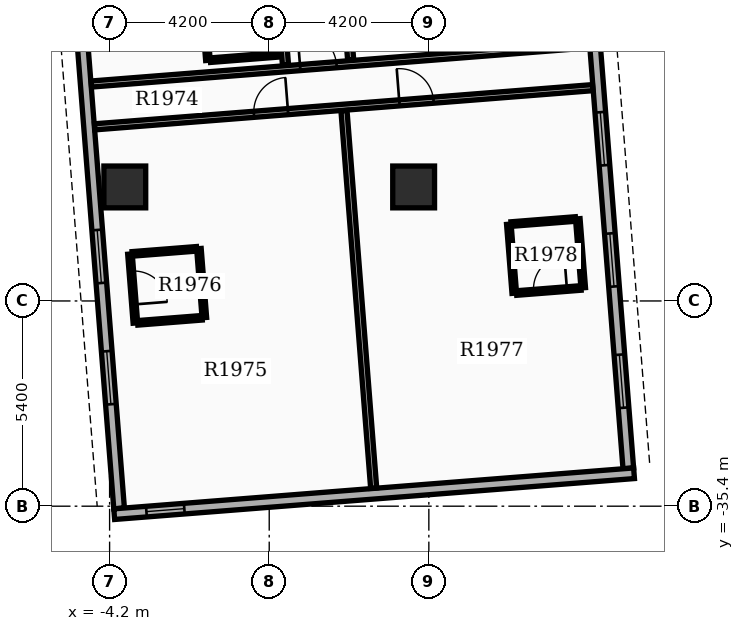
"""IFC4 building model, lengths in metres.
Left out: names, types, materials, properties, quantities, classifications, styles, units other than length and angle.
Written with IfcOpenShell. Run it as: python <this file> out.ifc"""

import sys

from ifc_helpers import new_model, si_unit, direction, frame, frame_2d, origin, origin_2d, place, context, subcontext, project, spatial, rectangle, extrude, element, fill, save


model = new_model("IFC4")
c1 = context("Model", 3, precision=1e-05, world=origin(), true_north=direction((0.0, 1.0)))
c2 = subcontext(c1, "Body", "Model", "MODEL_VIEW")
j1 = project(units=[si_unit("LENGTHUNIT", "METRE"), si_unit("PLANEANGLEUNIT", "RADIAN")], contexts=[c1])
p1 = place(None, origin())
s1 = spatial("IfcSite", under=j1, at=p1, CompositionType="ELEMENT")
p2 = place(p1, origin())
s2 = spatial("IfcBuilding", under=s1, at=p2, CompositionType="ELEMENT")
p3 = place(p2, frame((0.0, 0.0, 124.2)))
s3 = spatial("IfcBuildingStorey", under=s2, at=p3, CompositionType="ELEMENT", Elevation=124.2)
for number, where, z_axis, x_axis in (
    (1, (-3.8, -27.0, 0.0), (0.0, 0.0, 1.0), (1.0, 0.0, 0.0)),
    (2, (3.8, -27.0, 0.0), (0.0, 0.0, 1.0), (1.0, 0.0, 0.0)),
):
    element("IfcColumn", number, at=place(p3, frame(where, z_axis=z_axis, x_axis=x_axis)), inside=s3, PredefinedType="COLUMN", context=c2, shape_type="SweptSolid", body=[
        extrude(rectangle(XDim=1.1, YDim=1.1, at=origin_2d()), origin(), (0.0, 0.0, 1.0), 3.9),
    ])
p4 = place(p3, frame((-5.527, -15.421, 0.0), z_axis=(0.0, 0.0, 1.0), x_axis=(0.078452802979, -0.996917828963, 0.0)))
e3 = element("IfcWall", 3, at=p4, inside=s3, PredefinedType="STANDARD", context=c2, shape_type="SweptSolid", body=[
    extrude(rectangle(XDim=20.1, YDim=0.28, at=frame_2d((10.05, 0.0))), origin(), (0.0, 0.0, 1.0), 2.97),
])
p5 = place(p4, frame((1.6, 0.0, 0.8)))
e4 = element("IfcOpeningElement", 4, at=p5, cuts=e3, PredefinedType="OPENING", context=c2, shape_type="SweptSolid", body=[
    extrude(rectangle(XDim=1.4, YDim=1.6, at=frame_2d((0.7, 0.8))), frame((0.0, 0.15, 0.0), z_axis=(0.0, -1.0, 0.0), x_axis=(1.0, 0.0, 0.0)), (0.0, 0.0, 1.0), 0.3),
])
p6 = place(p4, frame((4.8, 0.0, 0.8)))
e5 = element("IfcOpeningElement", 5, at=p6, cuts=e3, PredefinedType="OPENING", context=c2, shape_type="SweptSolid", body=[
    extrude(rectangle(XDim=1.4, YDim=1.6, at=frame_2d((0.7, 0.8))), frame((0.0, 0.15, 0.0), z_axis=(0.0, -1.0, 0.0), x_axis=(1.0, 0.0, 0.0)), (0.0, 0.0, 1.0), 0.3),
])
p7 = place(p4, frame((12.75, 0.0, 0.8)))
e6 = element("IfcOpeningElement", 6, at=p7, cuts=e3, PredefinedType="OPENING", context=c2, shape_type="SweptSolid", body=[
    extrude(rectangle(XDim=1.4, YDim=1.6, at=frame_2d((0.7, 0.8))), frame((0.0, 0.15, 0.0), z_axis=(0.0, -1.0, 0.0), x_axis=(1.0, 0.0, 0.0)), (0.0, 0.0, 1.0), 0.3),
])
p8 = place(p4, frame((15.95, 0.0, 0.8)))
e7 = element("IfcOpeningElement", 7, at=p8, cuts=e3, PredefinedType="OPENING", context=c2, shape_type="SweptSolid", body=[
    extrude(rectangle(XDim=1.4, YDim=1.6, at=frame_2d((0.7, 0.8))), frame((0.0, 0.15, 0.0), z_axis=(0.0, -1.0, 0.0), x_axis=(1.0, 0.0, 0.0)), (0.0, 0.0, 1.0), 0.3),
])
p9 = place(p3, frame((9.448, -34.405, 0.0), z_axis=(0.0, 0.0, 1.0), x_axis=(-0.078452802979, 0.996917828963, 0.0)))
e8 = element("IfcWall", 8, at=p9, inside=s3, PredefinedType="STANDARD", context=c2, shape_type="SweptSolid", body=[
    extrude(rectangle(XDim=20.1, YDim=0.28, at=frame_2d((10.05, 0.0))), origin(), (0.0, 0.0, 1.0), 2.97),
])
p10 = place(p9, frame((1.6, 0.0, 0.8)))
e9 = element("IfcOpeningElement", 9, at=p10, cuts=e8, PredefinedType="OPENING", context=c2, shape_type="SweptSolid", body=[
    extrude(rectangle(XDim=1.4, YDim=1.6, at=frame_2d((0.7, 0.8))), frame((0.0, 0.15, 0.0), z_axis=(0.0, -1.0, 0.0), x_axis=(1.0, 0.0, 0.0)), (0.0, 0.0, 1.0), 0.3),
])
p11 = place(p9, frame((4.8, 0.0, 0.8)))
e10 = element("IfcOpeningElement", 10, at=p11, cuts=e8, PredefinedType="OPENING", context=c2, shape_type="SweptSolid", body=[
    extrude(rectangle(XDim=1.4, YDim=1.6, at=frame_2d((0.7, 0.8))), frame((0.0, 0.15, 0.0), z_axis=(0.0, -1.0, 0.0), x_axis=(1.0, 0.0, 0.0)), (0.0, 0.0, 1.0), 0.3),
])
p12 = place(p9, frame((8.0, 0.0, 0.8)))
e11 = element("IfcOpeningElement", 11, at=p12, cuts=e8, PredefinedType="OPENING", context=c2, shape_type="SweptSolid", body=[
    extrude(rectangle(XDim=1.4, YDim=1.6, at=frame_2d((0.7, 0.8))), frame((0.0, 0.15, 0.0), z_axis=(0.0, -1.0, 0.0), x_axis=(1.0, 0.0, 0.0)), (0.0, 0.0, 1.0), 0.3),
])
p13 = place(p9, frame((11.7, 0.0, 0.8)))
e12 = element("IfcOpeningElement", 12, at=p13, cuts=e8, PredefinedType="OPENING", context=c2, shape_type="SweptSolid", body=[
    extrude(rectangle(XDim=1.4, YDim=1.6, at=frame_2d((0.7, 0.8))), frame((0.0, 0.15, 0.0), z_axis=(0.0, -1.0, 0.0), x_axis=(1.0, 0.0, 0.0)), (0.0, 0.0, 1.0), 0.3),
])
p14 = place(p3, frame((-4.079, -35.61, 0.0), z_axis=(0.0, 0.0, 1.0), x_axis=(0.996916198482, 0.078473519122, 0.0)))
e13 = element("IfcWall", 13, at=p14, inside=s3, PredefinedType="STANDARD", context=c2, shape_type="SweptSolid", body=[
    extrude(rectangle(XDim=13.72, YDim=0.28, at=frame_2d((6.86, 0.0))), origin(), (0.0, 0.0, 1.0), 2.97),
])
p15 = place(p14, frame((0.85, 0.0, 0.85)))
e14 = element("IfcOpeningElement", 14, at=p15, cuts=e13, PredefinedType="OPENING", context=c2, shape_type="SweptSolid", body=[
    extrude(rectangle(XDim=1.0, YDim=1.5, at=frame_2d((0.5, 0.75))), frame((0.0, 0.15, 0.0), z_axis=(0.0, -1.0, 0.0), x_axis=(1.0, 0.0, 0.0)), (0.0, 0.0, 1.0), 0.3),
])
p16 = place(p3, frame((1.444, -14.782, 0.0), z_axis=(0.0, 0.0, 1.0), x_axis=(0.078454258523, -0.996917714418, 0.0)))
e15 = element("IfcWall", 15, at=p16, inside=s3, PredefinedType="PARTITIONING", context=c2, shape_type="SweptSolid", body=[
    extrude(rectangle(XDim=8.9, YDim=0.16, at=frame_2d((4.45, 0.0))), origin(), (0.0, 0.0, 1.0), 2.96),
])
p17 = place(p16, frame((7.5, 0.0, 0.0)))
e16 = element("IfcOpeningElement", 16, at=p17, cuts=e15, PredefinedType="OPENING", context=c2, shape_type="SweptSolid", body=[
    extrude(rectangle(XDim=0.96, YDim=2.15, at=frame_2d((0.48, 1.075))), frame((0.0, 0.09, 0.0), z_axis=(0.0, -1.0, 0.0), x_axis=(1.0, 0.0, 0.0)), (0.0, 0.0, 1.0), 0.18),
])
p18 = place(p3, frame((-0.271, -14.917, 0.0), z_axis=(0.0, 0.0, 1.0), x_axis=(0.078454258523, -0.996917714418, 0.0)))
e17 = element("IfcWall", 17, at=p18, inside=s3, PredefinedType="PARTITIONING", context=c2, shape_type="SweptSolid", body=[
    extrude(rectangle(XDim=8.9, YDim=0.16, at=frame_2d((4.45, 0.0))), origin(), (0.0, 0.0, 1.0), 2.96),
])
p19 = place(p18, frame((0.953, 0.0, 0.0)))
e18 = element("IfcOpeningElement", 18, at=p19, cuts=e17, PredefinedType="OPENING", context=c2, shape_type="SweptSolid", body=[
    extrude(rectangle(XDim=0.96, YDim=2.15, at=frame_2d((0.48, 1.075))), frame((0.0, 0.09, 0.0), z_axis=(0.0, -1.0, 0.0), x_axis=(1.0, 0.0, 0.0)), (0.0, 0.0, 1.0), 0.18),
])
p20 = place(p3, frame((-1.548, -23.664, 0.0), z_axis=(0.0, 0.0, 1.0), x_axis=(0.996916400774, 0.0784709492, 0.0)))
e19 = element("IfcWall", 19, at=p20, inside=s3, PredefinedType="PARTITIONING", context=c2, shape_type="SweptSolid", body=[
    extrude(rectangle(XDim=1.82, YDim=0.12, at=frame_2d((0.91, 0.0))), origin(), (0.0, 0.0, 1.0), 2.96),
])
p21 = place(p3, frame((-1.76, -21.795, 0.0), z_axis=(0.0, 0.0, 1.0), x_axis=(0.078573415792, -0.996908329954, 0.0)))
e20 = element("IfcWall", 20, at=p21, inside=s3, PredefinedType="PARTITIONING", context=c2, shape_type="SweptSolid", body=[
    extrude(rectangle(XDim=1.88, YDim=0.12, at=frame_2d((0.94, 0.0))), origin(), (0.0, 0.0, 1.0), 2.96),
])
p22 = place(p3, frame((-4.68, -24.292, 0.0), z_axis=(0.0, 0.0, 1.0), x_axis=(0.996917447065, 0.078457655694, 0.0)))
e21 = element("IfcWall", 21, at=p22, inside=s3, PredefinedType="PARTITIONING", context=c2, shape_type="SweptSolid", body=[
    extrude(rectangle(XDim=13.144, YDim=0.16, at=frame_2d((6.572, 0.0))), origin(), (0.0, 0.0, 1.0), 2.96),
])
p23 = place(p22, frame((5.512, 0.0, 0.0)))
e22 = element("IfcOpeningElement", 22, at=p23, cuts=e21, PredefinedType="OPENING", context=c2, shape_type="SweptSolid", body=[
    extrude(rectangle(XDim=0.96, YDim=2.15, at=frame_2d((0.48, 1.075))), frame((0.0, 0.09, 0.0), z_axis=(0.0, -1.0, 0.0), x_axis=(1.0, 0.0, 0.0)), (0.0, 0.0, 1.0), 0.18),
])
p24 = place(p3, frame((-4.592, -25.419, 0.0), z_axis=(0.0, 0.0, 1.0), x_axis=(0.996915994096, 0.078476115573, 0.0)))
e23 = element("IfcWall", 23, at=p24, inside=s3, PredefinedType="PARTITIONING", context=c2, shape_type="SweptSolid", body=[
    extrude(rectangle(XDim=13.144, YDim=0.16, at=frame_2d((6.572, 0.0))), origin(), (0.0, 0.0, 1.0), 2.96),
])
p25 = place(p24, frame((4.202, 0.0, 0.0)))
e24 = element("IfcOpeningElement", 24, at=p25, cuts=e23, PredefinedType="OPENING", context=c2, shape_type="SweptSolid", body=[
    extrude(rectangle(XDim=0.9, YDim=2.15, at=frame_2d((0.45, 1.075))), frame((0.0, 0.09, 0.0), z_axis=(0.0, -1.0, 0.0), x_axis=(1.0, 0.0, 0.0)), (0.0, 0.0, 1.0), 0.18),
])
p26 = place(p24, frame((8.042, 0.0, 0.0)))
e25 = element("IfcOpeningElement", 25, at=p26, cuts=e23, PredefinedType="OPENING", context=c2, shape_type="SweptSolid", body=[
    extrude(rectangle(XDim=0.9, YDim=2.15, at=frame_2d((0.45, 1.075))), frame((0.0, 0.09, 0.0), z_axis=(0.0, -1.0, 0.0), x_axis=(1.0, 0.0, 0.0)), (0.0, 0.0, 1.0), 0.18),
])
p27 = place(p3, frame((1.967, -24.993, 0.0), z_axis=(0.0, 0.0, 1.0), x_axis=(0.078446753713, -0.996918304994, 0.0)))
e26 = element("IfcWall", 26, at=p27, inside=s3, PredefinedType="PARTITIONING", context=c2, shape_type="SweptSolid", body=[
    extrude(rectangle(XDim=9.962, YDim=0.16, at=frame_2d((4.981, 0.0))), origin(), (0.0, 0.0, 1.0), 2.96),
])
p28 = place(p3, frame((-3.664, -28.766, 0.0), z_axis=(0.0, 0.0, 1.0), x_axis=(0.0784709492, -0.996916400774, 0.0)))
e27 = element("IfcWall", 27, at=p28, inside=s3, PredefinedType="PARTITIONING", context=c2, shape_type="SweptSolid", body=[
    extrude(rectangle(XDim=1.82, YDim=0.12, at=frame_2d((0.91, 0.0))), origin(), (0.0, 0.0, 1.0), 2.96),
])
p29 = place(p28, frame((0.45, 0.0, 0.0)))
e28 = element("IfcOpeningElement", 28, at=p29, cuts=e27, PredefinedType="OPENING", context=c2, shape_type="SweptSolid", body=[
    extrude(rectangle(XDim=0.88, YDim=2.1, at=frame_2d((0.44, 1.05))), frame((0.0, 0.07, 0.0), z_axis=(0.0, -1.0, 0.0), x_axis=(1.0, 0.0, 0.0)), (0.0, 0.0, 1.0), 0.14),
])
p30 = place(p3, frame((-1.85, -28.623, 0.0), z_axis=(0.0, 0.0, 1.0), x_axis=(0.0784709492, -0.996916400774, 0.0)))
e29 = element("IfcWall", 29, at=p30, inside=s3, PredefinedType="PARTITIONING", context=c2, shape_type="SweptSolid", body=[
    extrude(rectangle(XDim=1.82, YDim=0.12, at=frame_2d((0.91, 0.0))), origin(), (0.0, 0.0, 1.0), 2.96),
])
p31 = place(p3, frame((-3.604, -28.761, 0.0), z_axis=(0.0, 0.0, 1.0), x_axis=(0.996920349899, 0.078420762289, 0.0)))
e30 = element("IfcWall", 30, at=p31, inside=s3, PredefinedType="PARTITIONING", context=c2, shape_type="SweptSolid", body=[
    extrude(rectangle(XDim=1.7, YDim=0.12, at=frame_2d((0.85, 0.0))), origin(), (0.0, 0.0, 1.0), 2.96),
])
p32 = place(p3, frame((-3.462, -30.576, 0.0), z_axis=(0.0, 0.0, 1.0), x_axis=(0.996909111094, 0.078563504361, 0.0)))
e31 = element("IfcWall", 31, at=p32, inside=s3, PredefinedType="PARTITIONING", context=c2, shape_type="SweptSolid", body=[
    extrude(rectangle(XDim=1.7, YDim=0.12, at=frame_2d((0.85, 0.0))), origin(), (0.0, 0.0, 1.0), 2.96),
])
p33 = place(p3, frame((6.305, -27.982, 0.0), z_axis=(0.0, 0.0, 1.0), x_axis=(0.078481444107, -0.996915574626, 0.0)))
e32 = element("IfcWall", 32, at=p33, inside=s3, PredefinedType="PARTITIONING", context=c2, shape_type="SweptSolid", body=[
    extrude(rectangle(XDim=1.82, YDim=0.12, at=frame_2d((0.91, 0.0))), origin(), (0.0, 0.0, 1.0), 2.96),
])
p34 = place(p3, frame((8.119, -27.839, 0.0), z_axis=(0.0, 0.0, 1.0), x_axis=(0.0784709492, -0.996916400774, 0.0)))
e33 = element("IfcWall", 33, at=p34, inside=s3, PredefinedType="PARTITIONING", context=c2, shape_type="SweptSolid", body=[
    extrude(rectangle(XDim=1.82, YDim=0.12, at=frame_2d((0.91, 0.0))), origin(), (0.0, 0.0, 1.0), 2.96),
])
p35 = place(p3, frame((6.365, -27.977, 0.0), z_axis=(0.0, 0.0, 1.0), x_axis=(0.996920349899, 0.078420762289, 0.0)))
e34 = element("IfcWall", 34, at=p35, inside=s3, PredefinedType="PARTITIONING", context=c2, shape_type="SweptSolid", body=[
    extrude(rectangle(XDim=1.7, YDim=0.12, at=frame_2d((0.85, 0.0))), origin(), (0.0, 0.0, 1.0), 2.96),
])
p36 = place(p3, frame((6.508, -29.791, 0.0), z_axis=(0.0, 0.0, 1.0), x_axis=(0.996920349899, 0.078420762289, 0.0)))
e35 = element("IfcWall", 35, at=p36, inside=s3, PredefinedType="PARTITIONING", context=c2, shape_type="SweptSolid", body=[
    extrude(rectangle(XDim=1.7, YDim=0.12, at=frame_2d((0.85, 0.0))), origin(), (0.0, 0.0, 1.0), 2.96),
])
p37 = place(p36, frame((0.45, 0.0, 0.0)))
e36 = element("IfcOpeningElement", 36, at=p37, cuts=e35, PredefinedType="OPENING", context=c2, shape_type="SweptSolid", body=[
    extrude(rectangle(XDim=0.88, YDim=2.1, at=frame_2d((0.44, 1.05))), frame((0.0, 0.07, 0.0), z_axis=(0.0, -1.0, 0.0), x_axis=(1.0, 0.0, 0.0)), (0.0, 0.0, 1.0), 0.14),
])
p38 = place(p7, origin())
e37 = element("IfcWindow", 37, at=p38, inside=s3, PartitioningType="SINGLE_PANEL", PredefinedType="WINDOW", context=c2, shape_type="SweptSolid", body=[
    extrude(rectangle(XDim=1.4, YDim=1.6, at=frame_2d((0.7, 0.8))), frame((0.0, 0.03, 0.0), z_axis=(0.0, -1.0, 0.0), x_axis=(1.0, 0.0, 0.0)), (0.0, 0.0, 1.0), 0.06),
])
fill(e6, e37)
p39 = place(p8, origin())
e38 = element("IfcWindow", 38, at=p39, inside=s3, PartitioningType="SINGLE_PANEL", PredefinedType="WINDOW", context=c2, shape_type="SweptSolid", body=[
    extrude(rectangle(XDim=1.4, YDim=1.6, at=frame_2d((0.7, 0.8))), frame((0.0, 0.03, 0.0), z_axis=(0.0, -1.0, 0.0), x_axis=(1.0, 0.0, 0.0)), (0.0, 0.0, 1.0), 0.06),
])
fill(e7, e38)
p40 = place(p10, origin())
e39 = element("IfcWindow", 39, at=p40, inside=s3, PartitioningType="SINGLE_PANEL", PredefinedType="WINDOW", context=c2, shape_type="SweptSolid", body=[
    extrude(rectangle(XDim=1.4, YDim=1.6, at=frame_2d((0.7, 0.8))), frame((0.0, 0.03, 0.0), z_axis=(0.0, -1.0, 0.0), x_axis=(1.0, 0.0, 0.0)), (0.0, 0.0, 1.0), 0.06),
])
fill(e9, e39)
p41 = place(p11, origin())
e40 = element("IfcWindow", 40, at=p41, inside=s3, PartitioningType="SINGLE_PANEL", PredefinedType="WINDOW", context=c2, shape_type="SweptSolid", body=[
    extrude(rectangle(XDim=1.4, YDim=1.6, at=frame_2d((0.7, 0.8))), frame((0.0, 0.03, 0.0), z_axis=(0.0, -1.0, 0.0), x_axis=(1.0, 0.0, 0.0)), (0.0, 0.0, 1.0), 0.06),
])
fill(e10, e40)
p42 = place(p12, origin())
e41 = element("IfcWindow", 41, at=p42, inside=s3, PartitioningType="SINGLE_PANEL", PredefinedType="WINDOW", context=c2, shape_type="SweptSolid", body=[
    extrude(rectangle(XDim=1.4, YDim=1.6, at=frame_2d((0.7, 0.8))), frame((0.0, 0.03, 0.0), z_axis=(0.0, -1.0, 0.0), x_axis=(1.0, 0.0, 0.0)), (0.0, 0.0, 1.0), 0.06),
])
fill(e11, e41)
p43 = place(p15, origin())
e42 = element("IfcWindow", 42, at=p43, inside=s3, PartitioningType="SINGLE_PANEL", PredefinedType="WINDOW", context=c2, shape_type="SweptSolid", body=[
    extrude(rectangle(XDim=1.0, YDim=1.5, at=frame_2d((0.5, 0.75))), frame((0.0, 0.03, 0.0), z_axis=(0.0, -1.0, 0.0), x_axis=(1.0, 0.0, 0.0)), (0.0, 0.0, 1.0), 0.06),
])
fill(e14, e42)
p44 = place(p23, origin())
e43 = element("IfcDoor", 43, at=p44, inside=s3, OperationType="SINGLE_SWING_LEFT", PredefinedType="DOOR", context=c2, shape_type="SweptSolid", body=[
    extrude(rectangle(XDim=0.96, YDim=2.15, at=frame_2d((0.48, 1.075))), frame((0.0, 0.025, 0.0), z_axis=(0.0, -1.0, 0.0), x_axis=(1.0, 0.0, 0.0)), (0.0, 0.0, 1.0), 0.05),
])
fill(e22, e43)
p45 = place(p25, origin())
e44 = element("IfcDoor", 44, at=p45, inside=s3, OperationType="SINGLE_SWING_RIGHT", PredefinedType="DOOR", context=c2, shape_type="SweptSolid", body=[
    extrude(rectangle(XDim=0.9, YDim=2.15, at=frame_2d((0.45, 1.075))), frame((0.0, 0.025, 0.0), z_axis=(0.0, -1.0, 0.0), x_axis=(1.0, 0.0, 0.0)), (0.0, 0.0, 1.0), 0.05),
])
fill(e24, e44)
p46 = place(p29, origin())
e45 = element("IfcDoor", 45, at=p46, inside=s3, OperationType="SINGLE_SWING_RIGHT", PredefinedType="DOOR", context=c2, shape_type="SweptSolid", body=[
    extrude(rectangle(XDim=0.88, YDim=2.1, at=frame_2d((0.44, 1.05))), frame((0.0, 0.025, 0.0), z_axis=(0.0, -1.0, 0.0), x_axis=(1.0, 0.0, 0.0)), (0.0, 0.0, 1.0), 0.05),
])
fill(e28, e45)
p47 = place(p26, origin())
e46 = element("IfcDoor", 46, at=p47, inside=s3, OperationType="SINGLE_SWING_LEFT", PredefinedType="DOOR", context=c2, shape_type="SweptSolid", body=[
    extrude(rectangle(XDim=0.9, YDim=2.15, at=frame_2d((0.45, 1.075))), frame((0.0, 0.025, 0.0), z_axis=(0.0, -1.0, 0.0), x_axis=(1.0, 0.0, 0.0)), (0.0, 0.0, 1.0), 0.05),
])
fill(e25, e46)
p48 = place(p37, origin())
e47 = element("IfcDoor", 47, at=p48, inside=s3, OperationType="SINGLE_SWING_RIGHT", PredefinedType="DOOR", context=c2, shape_type="SweptSolid", body=[
    extrude(rectangle(XDim=0.88, YDim=2.1, at=frame_2d((0.44, 1.05))), frame((0.0, 0.025, 0.0), z_axis=(0.0, -1.0, 0.0), x_axis=(1.0, 0.0, 0.0)), (0.0, 0.0, 1.0), 0.05),
])
fill(e36, e47)
save(model, sys.argv[1])
